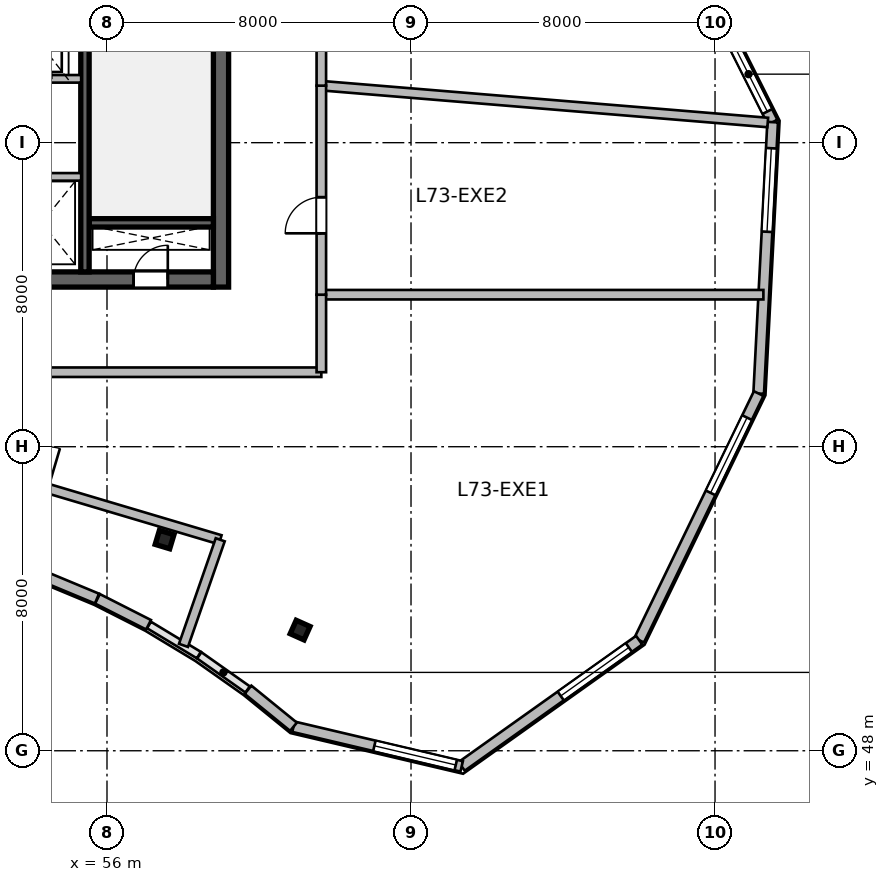
"""IFC4 building model, lengths in metres.
Left out: names, types, materials, properties, quantities, classifications, styles, units other than length and angle.
Written with IfcOpenShell. Run it as: python <this file> out.ifc"""

import sys

from ifc_helpers import new_model, si_unit, direction, frame, frame_2d, origin, origin_2d, place, context, subcontext, project, spatial, rectangle, i_section, extrude, source, transform, mapped, element, fill, save


model = new_model("IFC4")
c1 = context("Model", 3, precision=1e-05, world=origin(), true_north=direction((0.0, 1.0)))
c2 = subcontext(c1, "Body", "Model", "MODEL_VIEW")
j1 = project(units=[si_unit("LENGTHUNIT", "METRE"), si_unit("PLANEANGLEUNIT", "RADIAN")], contexts=[c1])
p1 = place(None, origin())
s1 = spatial("IfcSite", under=j1, at=p1, CompositionType="ELEMENT")
p2 = place(p1, origin())
s2 = spatial("IfcBuilding", under=s1, at=p2, CompositionType="ELEMENT")
p3 = place(p2, frame((0.0, 0.0, 299.1)))
s3 = spatial("IfcBuildingStorey", under=s2, at=p3, CompositionType="ELEMENT", Elevation=299.1)
m1 = source(origin(), c2, "Body", "SweptSolid", [
    extrude(rectangle(XDim=12.0, YDim=0.4, at=frame_2d((6.0, 0.0))), origin(), (0.0, 0.0, 1.0), 3.9),
])
p4 = place(p3, frame((59.0, 60.2, 0.0), z_axis=(0.0, 0.0, 1.0), x_axis=(0.0, 1.0, 0.0)))
e1 = element("IfcWall", 1, at=p4, inside=s3, PredefinedType="SHEAR", context=c2, shape_type="MappedRepresentation", body=[
    mapped(m1, transform((0.0, 0.0, 0.0), scale=1.0)),
])
m2 = source(origin(), c2, "Body", "SweptSolid", [
    extrude(rectangle(XDim=21.6, YDim=0.4, at=frame_2d((10.8, 0.0))), origin(), (0.0, 0.0, 1.0), 3.9),
])
p5 = place(p3, frame((37.2, 60.4, 0.0), z_axis=(0.0, 0.0, 1.0), x_axis=(1.0, 0.0, 0.0)))
e2 = element("IfcWall", 2, at=p5, inside=s3, PredefinedType="SHEAR", context=c2, shape_type="MappedRepresentation", body=[
    mapped(m2, transform((0.0, 0.0, 0.0), scale=1.0)),
])
p6 = place(p5, frame((1.1, 0.0, 0.0)))
e3 = element("IfcOpeningElement", 3, at=p6, cuts=e2, PredefinedType="OPENING", context=c2, shape_type="SweptSolid", body=[
    extrude(rectangle(XDim=1.15, YDim=2.15, at=frame_2d((0.575, 1.075))), frame((0.0, 0.21, 0.0), z_axis=(0.0, -1.0, 0.0), x_axis=(1.0, 0.0, 0.0)), (0.0, 0.0, 1.0), 0.42),
])
p7 = place(p5, frame((19.5, 0.0, 0.0)))
e4 = element("IfcOpeningElement", 4, at=p7, cuts=e2, PredefinedType="OPENING", context=c2, shape_type="SweptSolid", body=[
    extrude(rectangle(XDim=0.9, YDim=2.1, at=frame_2d((0.45, 1.05))), frame((0.0, 0.21, 0.0), z_axis=(0.0, -1.0, 0.0), x_axis=(1.0, 0.0, 0.0)), (0.0, 0.0, 1.0), 0.42),
])
p8 = place(p5, frame((12.02, 0.0, 0.0)))
e5 = element("IfcOpeningElement", 5, at=p8, cuts=e2, PredefinedType="OPENING", context=c2, shape_type="SweptSolid", body=[
    extrude(rectangle(XDim=1.6, YDim=2.15, at=frame_2d((0.8, 1.075))), frame((0.0, 0.21, 0.0), z_axis=(0.0, -1.0, 0.0), x_axis=(1.0, 0.0, 0.0)), (0.0, 0.0, 1.0), 0.42),
])
m3 = source(origin(), c2, "Body", "SweptSolid", [
    extrude(rectangle(XDim=3.27, YDim=0.22, at=frame_2d((1.635, 0.0))), origin(), (0.0, 0.0, 1.0), 3.9),
])
p9 = place(p3, frame((55.53, 61.89, 0.0), z_axis=(0.0, 0.0, 1.0), x_axis=(1.0, 0.0, 0.0)))
e6 = element("IfcWall", 6, at=p9, inside=s3, PredefinedType="SHEAR", context=c2, shape_type="MappedRepresentation", body=[
    mapped(m3, transform((0.0, 0.0, 0.0), scale=1.0)),
])
m4 = source(origin(), c2, "Body", "SweptSolid", [
    extrude(rectangle(XDim=11.2, YDim=0.22, at=frame_2d((5.6, 0.0))), origin(), (0.0, 0.0, 1.0), 3.9),
])
p10 = place(p3, frame((55.42, 60.6, 0.0), z_axis=(0.0, 0.0, 1.0), x_axis=(0.0, 1.0, 0.0)))
e7 = element("IfcWall", 7, at=p10, inside=s3, PredefinedType="SHEAR", context=c2, shape_type="MappedRepresentation", body=[
    mapped(m4, transform((0.0, 0.0, 0.0), scale=1.0)),
])
p11 = place(p10, frame((9.645, 0.0, 0.0)))
e8 = element("IfcOpeningElement", 8, at=p11, cuts=e7, PredefinedType="OPENING", context=c2, shape_type="SweptSolid", body=[
    extrude(rectangle(XDim=1.15, YDim=2.15, at=frame_2d((0.575, 1.075))), frame((0.0, 0.12, 0.0), z_axis=(0.0, -1.0, 0.0), x_axis=(1.0, 0.0, 0.0)), (0.0, 0.0, 1.0), 0.24),
])
m5 = source(origin(), c2, "Body", "SweptSolid", [
    extrude(i_section(OverallWidth=0.399, OverallDepth=0.387, WebThickness=0.021, FlangeThickness=0.033, at=origin_2d()), origin(), (0.0, 0.0, 1.0), 3.9),
])
for number, where, z_axis, x_axis in (
    (9, (57.515, 53.558, 0.0), (0.0, 0.0, 1.0), (0.289, 0.957, 0.0)),
    (10, (61.082, 51.175, 0.0), (0.0, 0.0, 1.0), (0.409, 0.912, 0.0)),
):
    element("IfcColumn", number, at=place(p3, frame(where, z_axis=z_axis, x_axis=x_axis)), inside=s3, PredefinedType="COLUMN", context=c2, shape_type="MappedRepresentation", body=[
        mapped(m5, transform((0.0, 0.0, 0.0), scale=1.0)),
    ])
m6 = source(origin(), c2, "Body", "SweptSolid", [
    extrude(rectangle(XDim=5.653, YDim=0.28, at=frame_2d((2.827, 0.0))), origin(), (0.0, 0.0, 1.0), 3.64),
])
p12 = place(p3, frame((70.976, 69.591, 0.0), z_axis=(0.0, 0.0, 1.0), x_axis=(0.449302555419, -0.893379658205, 0.0)))
e11 = element("IfcWall", 11, at=p12, inside=s3, PredefinedType="SOLIDWALL", context=c2, shape_type="MappedRepresentation", body=[
    mapped(m6, transform((0.0, 0.0, 0.0), scale=1.0)),
])
p13 = place(p12, frame((3.14, 0.0, 0.95)))
e12 = element("IfcOpeningElement", 12, at=p13, cuts=e11, PredefinedType="OPENING", context=c2, shape_type="SweptSolid", body=[
    extrude(rectangle(XDim=2.2, YDim=2.1, at=frame_2d((1.1, 1.05))), frame((0.0, 0.15, 0.0), z_axis=(0.0, -1.0, 0.0), x_axis=(1.0, 0.0, 0.0)), (0.0, 0.0, 1.0), 0.3),
])
m7 = source(origin(), c2, "Body", "SweptSolid", [
    extrude(rectangle(XDim=7.151, YDim=0.28, at=frame_2d((3.576, 0.0))), origin(), (0.0, 0.0, 1.0), 3.64),
])
p14 = place(p3, frame((73.516, 64.54, 0.0), z_axis=(0.0, 0.0, 1.0), x_axis=(-0.051449614265, -0.998675591567, 0.0)))
e13 = element("IfcWall", 13, at=p14, inside=s3, PredefinedType="SOLIDWALL", context=c2, shape_type="MappedRepresentation", body=[
    mapped(m7, transform((0.0, 0.0, 0.0), scale=1.0)),
])
p15 = place(p14, frame((0.688, 0.0, 0.95)))
e14 = element("IfcOpeningElement", 14, at=p15, cuts=e13, PredefinedType="OPENING", context=c2, shape_type="SweptSolid", body=[
    extrude(rectangle(XDim=2.2, YDim=2.1, at=frame_2d((1.1, 1.05))), frame((0.0, 0.15, 0.0), z_axis=(0.0, -1.0, 0.0), x_axis=(1.0, 0.0, 0.0)), (0.0, 0.0, 1.0), 0.3),
])
m8 = source(origin(), c2, "Body", "SweptSolid", [
    extrude(rectangle(XDim=7.211, YDim=0.28, at=frame_2d((3.606, 0.0))), origin(), (0.0, 0.0, 1.0), 3.64),
])
p16 = place(p3, frame((73.148, 57.399, 0.0), z_axis=(0.0, 0.0, 1.0), x_axis=(-0.436088263006, -0.899903898685, 0.0)))
e15 = element("IfcWall", 15, at=p16, inside=s3, PredefinedType="SOLIDWALL", context=c2, shape_type="MappedRepresentation", body=[
    mapped(m8, transform((0.0, 0.0, 0.0), scale=1.0)),
])
p17 = place(p16, frame((0.703, 0.0, 0.95)))
e16 = element("IfcOpeningElement", 16, at=p17, cuts=e15, PredefinedType="OPENING", context=c2, shape_type="SweptSolid", body=[
    extrude(rectangle(XDim=2.2, YDim=2.1, at=frame_2d((1.1, 1.05))), frame((0.0, 0.15, 0.0), z_axis=(0.0, -1.0, 0.0), x_axis=(1.0, 0.0, 0.0)), (0.0, 0.0, 1.0), 0.3),
])
m9 = source(origin(), c2, "Body", "SweptSolid", [
    extrude(rectangle(XDim=5.731, YDim=0.28, at=frame_2d((2.865, 0.0))), origin(), (0.0, 0.0, 1.0), 3.64),
])
p18 = place(p3, frame((70.004, 50.909, 0.0), z_axis=(0.0, 0.0, 1.0), x_axis=(-0.815021045908, -0.579431354629, 0.0)))
e17 = element("IfcWall", 17, at=p18, inside=s3, PredefinedType="SOLIDWALL", context=c2, shape_type="MappedRepresentation", body=[
    mapped(m9, transform((0.0, 0.0, 0.0), scale=1.0)),
])
p19 = place(p18, frame((0.333, 0.0, 0.95)))
e18 = element("IfcOpeningElement", 18, at=p19, cuts=e17, PredefinedType="OPENING", context=c2, shape_type="SweptSolid", body=[
    extrude(rectangle(XDim=2.2, YDim=2.1, at=frame_2d((1.1, 1.05))), frame((0.0, 0.15, 0.0), z_axis=(0.0, -1.0, 0.0), x_axis=(1.0, 0.0, 0.0)), (0.0, 0.0, 1.0), 0.3),
])
m10 = source(origin(), c2, "Body", "SweptSolid", [
    extrude(rectangle(XDim=4.547, YDim=0.28, at=frame_2d((2.273, 0.0))), origin(), (0.0, 0.0, 1.0), 3.64),
])
p20 = place(p3, frame((65.333, 47.589, 0.0), z_axis=(0.0, 0.0, 1.0), x_axis=(-0.973332593516, 0.229398479505, 0.0)))
e19 = element("IfcWall", 19, at=p20, inside=s3, PredefinedType="SOLIDWALL", context=c2, shape_type="MappedRepresentation", body=[
    mapped(m10, transform((0.0, 0.0, 0.0), scale=1.0)),
])
p21 = place(p20, frame((0.16, 0.0, 0.95)))
e20 = element("IfcOpeningElement", 20, at=p21, cuts=e19, PredefinedType="OPENING", context=c2, shape_type="SweptSolid", body=[
    extrude(rectangle(XDim=2.2, YDim=2.1, at=frame_2d((1.1, 1.05))), frame((0.0, 0.15, 0.0), z_axis=(0.0, -1.0, 0.0), x_axis=(1.0, 0.0, 0.0)), (0.0, 0.0, 1.0), 0.3),
])
m11 = source(origin(), c2, "Body", "SweptSolid", [
    extrude(rectangle(XDim=1.543, YDim=0.28, at=frame_2d((0.772, 0.0))), origin(), (0.0, 0.0, 1.0), 3.64),
])
p22 = place(p3, frame((60.908, 48.632, 0.0), z_axis=(0.0, 0.0, 1.0), x_axis=(-0.77582846857, 0.63094388606, 0.0)))
e21 = element("IfcWall", 21, at=p22, inside=s3, PredefinedType="SOLIDWALL", context=c2, shape_type="MappedRepresentation", body=[
    mapped(m11, transform((0.0, 0.0, 0.0), scale=1.0)),
])
m12 = source(origin(), c2, "Body", "SweptSolid", [
    extrude(rectangle(XDim=1.509, YDim=0.28, at=frame_2d((0.754, 0.0))), origin(), (0.0, 0.0, 1.0), 3.64),
])
p23 = place(p3, frame((57.094, 51.315, 0.0), z_axis=(0.0, 0.0, 1.0), x_axis=(-0.89169189228, 0.452642871635, 0.0)))
e22 = element("IfcWall", 22, at=p23, inside=s3, PredefinedType="SOLIDWALL", context=c2, shape_type="MappedRepresentation", body=[
    mapped(m12, transform((0.0, 0.0, 0.0), scale=1.0)),
])
m13 = source(origin(), c2, "Body", "SweptSolid", [
    extrude(rectangle(XDim=1.488, YDim=0.28, at=frame_2d((0.744, 0.0))), origin(), (0.0, 0.0, 1.0), 3.64),
])
p24 = place(p3, frame((55.736, 52.004, 0.0), z_axis=(0.0, 0.0, 1.0), x_axis=(-0.923261314935, 0.384172545017, 0.0)))
e23 = element("IfcWall", 23, at=p24, inside=s3, PredefinedType="SOLIDWALL", context=c2, shape_type="MappedRepresentation", body=[
    mapped(m13, transform((0.0, 0.0, 0.0), scale=1.0)),
])
m14 = source(origin(), c2, "Body", "SweptSolid", [
    extrude(rectangle(XDim=5.62, YDim=0.2, at=frame_2d((2.81, 0.0))), origin(), (0.0, 0.0, 1.0), 3.64),
])
p25 = place(p3, frame((49.7, 65.68, 0.0), z_axis=(0.0, 0.0, 1.0), x_axis=(1.0, 0.0, 0.0)))
e24 = element("IfcWall", 24, at=p25, inside=s3, PredefinedType="SOLIDWALL", context=c2, shape_type="MappedRepresentation", body=[
    mapped(m14, transform((0.0, 0.0, 0.0), scale=1.0)),
])
m15 = source(origin(), c2, "Body", "SweptSolid", [
    extrude(rectangle(XDim=4.1, YDim=0.2, at=frame_2d((2.05, 0.0))), origin(), (0.0, 0.0, 1.0), 3.64),
])
p26 = place(p3, frame((51.22, 63.1, 0.0), z_axis=(0.0, 0.0, 1.0), x_axis=(1.0, 0.0, 0.0)))
e25 = element("IfcWall", 25, at=p26, inside=s3, PredefinedType="SOLIDWALL", context=c2, shape_type="MappedRepresentation", body=[
    mapped(m15, transform((0.0, 0.0, 0.0), scale=1.0)),
])
m16 = source(origin(), c2, "Body", "SweptSolid", [
    extrude(rectangle(XDim=11.454, YDim=0.25, at=frame_2d((5.727, 0.0))), origin(), (0.0, 0.0, 1.0), 3.314),
])
p27 = place(p3, frame((48.0, 56.813, 0.0), z_axis=(0.0, 0.0, 1.0), x_axis=(0.958594874645, -0.284773359541, 0.0)))
e26 = element("IfcWall", 26, at=p27, inside=s3, PredefinedType="PARTITIONING", context=c2, shape_type="MappedRepresentation", body=[
    mapped(m16, transform((0.0, 0.0, 0.0), scale=1.0)),
])
p28 = place(p27, frame((5.627, 0.0, 0.0)))
e27 = element("IfcOpeningElement", 27, at=p28, cuts=e26, PredefinedType="OPENING", context=c2, shape_type="SweptSolid", body=[
    extrude(rectangle(XDim=1.1, YDim=2.15, at=frame_2d((0.55, 1.075))), frame((0.0, 0.135, 0.0), z_axis=(0.0, -1.0, 0.0), x_axis=(1.0, 0.0, 0.0)), (0.0, 0.0, 1.0), 0.27),
])
m17 = source(origin(), c2, "Body", "SweptSolid", [
    extrude(rectangle(XDim=2.942, YDim=0.25, at=frame_2d((1.471, 0.0))), origin(), (0.0, 0.0, 1.0), 3.64),
])
p29 = place(p3, frame((58.013, 50.773, 0.0), z_axis=(0.0, 0.0, 1.0), x_axis=(0.328623620494, 0.944460965871, 0.0)))
e28 = element("IfcWall", 28, at=p29, inside=s3, PredefinedType="PARTITIONING", context=c2, shape_type="MappedRepresentation", body=[
    mapped(m17, transform((0.0, 0.0, 0.0), scale=1.0)),
])
m18 = source(origin(), c2, "Body", "SweptSolid", [
    extrude(rectangle(XDim=12.39, YDim=0.25, at=frame_2d((6.195, 0.0))), origin(), (0.0, 0.0, 1.0), 3.64),
])
p30 = place(p3, frame((49.25, 57.96, 0.0), z_axis=(0.0, 0.0, 1.0), x_axis=(1.0, 0.0, 0.0)))
e29 = element("IfcWall", 29, at=p30, inside=s3, PredefinedType="PARTITIONING", context=c2, shape_type="MappedRepresentation", body=[
    mapped(m18, transform((0.0, 0.0, 0.0), scale=1.0)),
])
m19 = source(origin(), c2, "Body", "SweptSolid", [
    extrude(rectangle(XDim=11.633, YDim=0.25, at=frame_2d((5.816, 0.0))), origin(), (0.0, 0.0, 1.0), 3.64),
])
p31 = place(p3, frame((61.64, 60.0, 0.0), z_axis=(0.0, 0.0, 1.0), x_axis=(1.0, 0.0, 0.0)))
e30 = element("IfcWall", 30, at=p31, inside=s3, PredefinedType="PARTITIONING", context=c2, shape_type="MappedRepresentation", body=[
    mapped(m19, transform((0.0, 0.0, 0.0), scale=1.0)),
])
m20 = source(origin(), c2, "Body", "SweptSolid", [
    extrude(rectangle(XDim=2.04, YDim=0.25, at=frame_2d((1.02, 0.0))), origin(), (0.0, 0.0, 1.0), 3.64),
])
p32 = place(p3, frame((61.64, 57.96, 0.0), z_axis=(0.0, 0.0, 1.0), x_axis=(0.0, 1.0, 0.0)))
e31 = element("IfcWall", 31, at=p32, inside=s3, PredefinedType="PARTITIONING", context=c2, shape_type="MappedRepresentation", body=[
    mapped(m20, transform((0.0, 0.0, 0.0), scale=1.0)),
])
m21 = source(origin(), c2, "Body", "SweptSolid", [
    extrude(rectangle(XDim=11.787, YDim=0.25, at=frame_2d((5.893, 0.0))), origin(), (0.0, 0.0, 1.0), 3.64),
])
p33 = place(p3, frame((61.64, 65.5, 0.0), z_axis=(0.0, 0.0, 1.0), x_axis=(0.996614976318, -0.082210637868, 0.0)))
e32 = element("IfcWall", 32, at=p33, inside=s3, PredefinedType="PARTITIONING", context=c2, shape_type="MappedRepresentation", body=[
    mapped(m21, transform((0.0, 0.0, 0.0), scale=1.0)),
])
m22 = source(origin(), c2, "Body", "SweptSolid", [
    extrude(rectangle(XDim=5.5, YDim=0.25, at=frame_2d((2.75, 0.0))), origin(), (0.0, 0.0, 1.0), 3.64),
])
p34 = place(p3, frame((61.64, 60.0, 0.0), z_axis=(0.0, 0.0, 1.0), x_axis=(0.0, 1.0, 0.0)))
e33 = element("IfcWall", 33, at=p34, inside=s3, PredefinedType="PARTITIONING", context=c2, shape_type="MappedRepresentation", body=[
    mapped(m22, transform((0.0, 0.0, 0.0), scale=1.0)),
])
p35 = place(p34, frame((1.615, 0.0, 0.0)))
e34 = element("IfcOpeningElement", 34, at=p35, cuts=e33, PredefinedType="OPENING", context=c2, shape_type="SweptSolid", body=[
    extrude(rectangle(XDim=0.95, YDim=2.1, at=frame_2d((0.475, 1.05))), frame((0.0, 0.135, 0.0), z_axis=(0.0, -1.0, 0.0), x_axis=(1.0, 0.0, 0.0)), (0.0, 0.0, 1.0), 0.27),
])
m23 = source(origin(), c2, "Body", "SweptSolid", [
    extrude(rectangle(XDim=10.153, YDim=0.25, at=frame_2d((5.077, 0.0))), origin(), (0.0, 0.0, 1.0), 3.64),
])
p36 = place(p3, frame((61.64, 65.5, 0.0), z_axis=(0.0, 0.0, 1.0), x_axis=(0.0, 1.0, 0.0)))
e35 = element("IfcWall", 35, at=p36, inside=s3, PredefinedType="PARTITIONING", context=c2, shape_type="MappedRepresentation", body=[
    mapped(m23, transform((0.0, 0.0, 0.0), scale=1.0)),
])
p37 = place(p36, frame((4.602, 0.0, 0.0)))
e36 = element("IfcOpeningElement", 36, at=p37, cuts=e35, PredefinedType="OPENING", context=c2, shape_type="SweptSolid", body=[
    extrude(rectangle(XDim=0.95, YDim=2.1, at=frame_2d((0.475, 1.05))), frame((0.0, 0.135, 0.0), z_axis=(0.0, -1.0, 0.0), x_axis=(1.0, 0.0, 0.0)), (0.0, 0.0, 1.0), 0.27),
])
m24 = source(origin(), c2, "Body", "SweptSolid", [
    extrude(rectangle(XDim=2.2, YDim=2.1, at=frame_2d((1.1, 1.05))), frame((0.0, 0.03, 0.0), z_axis=(0.0, -1.0, 0.0), x_axis=(1.0, 0.0, 0.0)), (0.0, 0.0, 1.0), 0.06),
])
p38 = place(p13, origin())
e37 = element("IfcWindow", 37, at=p38, inside=s3, PartitioningType="TRIPLE_PANEL_VERTICAL", PredefinedType="WINDOW", context=c2, shape_type="MappedRepresentation", body=[
    mapped(m24, transform((0.0, 0.0, 0.0), scale=1.0)),
])
fill(e12, e37)
p39 = place(p15, origin())
e38 = element("IfcWindow", 38, at=p39, inside=s3, PartitioningType="TRIPLE_PANEL_VERTICAL", PredefinedType="WINDOW", context=c2, shape_type="MappedRepresentation", body=[
    mapped(m24, transform((0.0, 0.0, 0.0), scale=1.0)),
])
fill(e14, e38)
p40 = place(p17, origin())
e39 = element("IfcWindow", 39, at=p40, inside=s3, PartitioningType="TRIPLE_PANEL_VERTICAL", PredefinedType="WINDOW", context=c2, shape_type="MappedRepresentation", body=[
    mapped(m24, transform((0.0, 0.0, 0.0), scale=1.0)),
])
fill(e16, e39)
p41 = place(p19, origin())
e40 = element("IfcWindow", 40, at=p41, inside=s3, PartitioningType="TRIPLE_PANEL_VERTICAL", PredefinedType="WINDOW", context=c2, shape_type="MappedRepresentation", body=[
    mapped(m24, transform((0.0, 0.0, 0.0), scale=1.0)),
])
fill(e18, e40)
p42 = place(p21, origin())
e41 = element("IfcWindow", 41, at=p42, inside=s3, PartitioningType="TRIPLE_PANEL_VERTICAL", PredefinedType="WINDOW", context=c2, shape_type="MappedRepresentation", body=[
    mapped(m24, transform((0.0, 0.0, 0.0), scale=1.0)),
])
fill(e20, e41)
m25 = source(origin(), c2, "Body", "SweptSolid", [
    extrude(rectangle(XDim=0.9, YDim=2.1, at=frame_2d((0.45, 1.05))), frame((0.0, 0.025, 0.0), z_axis=(0.0, -1.0, 0.0), x_axis=(1.0, 0.0, 0.0)), (0.0, 0.0, 1.0), 0.05),
])
p43 = place(p7, origin())
e42 = element("IfcDoor", 42, at=p43, inside=s3, OperationType="SINGLE_SWING_RIGHT", PredefinedType="DOOR", context=c2, shape_type="MappedRepresentation", body=[
    mapped(m25, transform((0.0, 0.0, 0.0), scale=1.0)),
])
fill(e4, e42)
m26 = source(origin(), c2, "Body", "SweptSolid", [
    extrude(rectangle(XDim=0.95, YDim=2.1, at=frame_2d((0.475, 1.05))), frame((0.0, 0.025, 0.0), z_axis=(0.0, -1.0, 0.0), x_axis=(1.0, 0.0, 0.0)), (0.0, 0.0, 1.0), 0.05),
])
p44 = place(p35, origin())
e43 = element("IfcDoor", 43, at=p44, inside=s3, OperationType="SINGLE_SWING_LEFT", PredefinedType="DOOR", context=c2, shape_type="MappedRepresentation", body=[
    mapped(m26, transform((0.0, 0.0, 0.0), scale=1.0)),
])
fill(e34, e43)
save(model, sys.argv[1])
